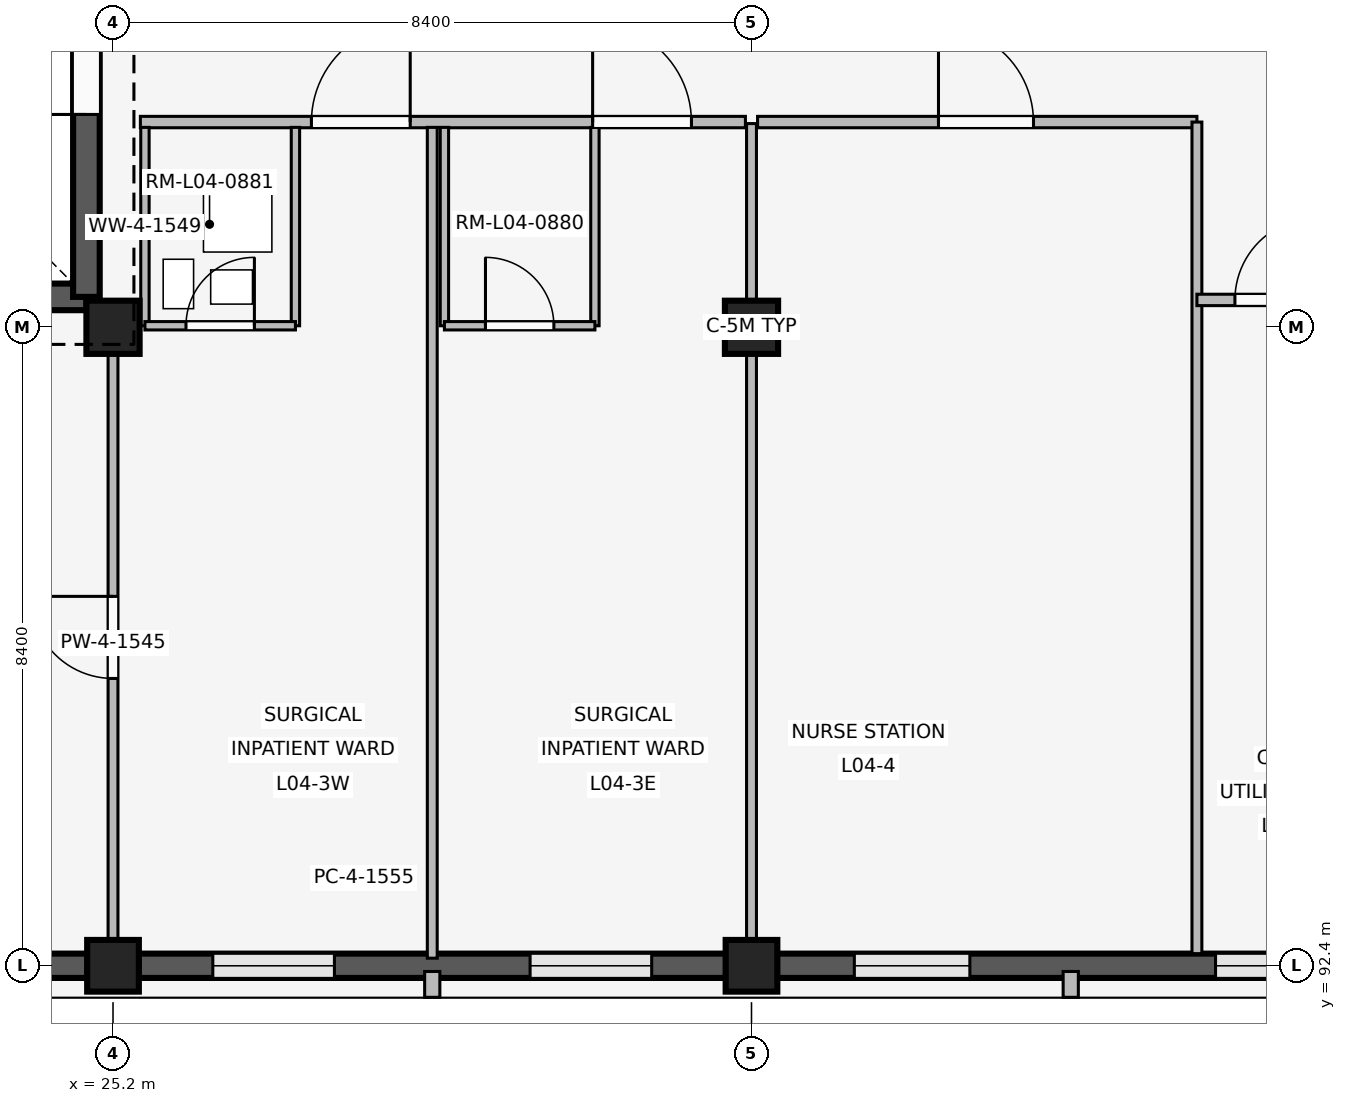
"""IFC4 building model, lengths in metres.
Left out: names, types, materials, properties, quantities, classifications, styles, units other than length and angle.
Written with IfcOpenShell. Run it as: python <this file> out.ifc"""

import sys

from ifc_helpers import new_model, si_unit, direction, frame, frame_2d, origin, origin_2d, place, context, subcontext, project, spatial, rectangle, extrude, element, fill, save


model = new_model("IFC4")
c1 = context("Model", 3, precision=1e-05, world=origin(), true_north=direction((0.0, 1.0)))
c2 = subcontext(c1, "Body", "Model", "MODEL_VIEW")
j1 = project(units=[si_unit("LENGTHUNIT", "METRE"), si_unit("PLANEANGLEUNIT", "RADIAN")], contexts=[c1])
p1 = place(None, origin())
s1 = spatial("IfcSite", under=j1, at=p1, CompositionType="ELEMENT")
p2 = place(p1, origin())
s2 = spatial("IfcBuilding", under=s1, at=p2, CompositionType="ELEMENT")
p3 = place(p2, frame((0.0, 0.0, 16.2)))
s3 = spatial("IfcBuildingStorey", under=s2, at=p3, CompositionType="ELEMENT", Elevation=16.2)
p4 = place(p3, frame((25.2, 92.4, 0.0), z_axis=(0.0, 0.0, 1.0), x_axis=(1.0, 0.0, 0.0)))
e1 = element("IfcColumn", 1, at=p4, inside=s3, PredefinedType="COLUMN", context=c2, shape_type="SweptSolid", body=[
    extrude(rectangle(XDim=0.68, YDim=0.68, at=origin_2d()), origin(), (0.0, 0.0, 1.0), 4.2),
])
p5 = place(p3, frame((25.2, 100.8, 0.0), z_axis=(0.0, 0.0, 1.0), x_axis=(1.0, 0.0, 0.0)))
e2 = element("IfcColumn", 2, at=p5, inside=s3, PredefinedType="COLUMN", context=c2, shape_type="SweptSolid", body=[
    extrude(rectangle(XDim=0.7, YDim=0.7, at=origin_2d()), origin(), (0.0, 0.0, 1.0), 4.2),
])
p6 = place(p3, frame((33.6, 92.4, 0.0), z_axis=(0.0, 0.0, 1.0), x_axis=(1.0, 0.0, 0.0)))
e3 = element("IfcColumn", 3, at=p6, inside=s3, PredefinedType="COLUMN", context=c2, shape_type="SweptSolid", body=[
    extrude(rectangle(XDim=0.68, YDim=0.68, at=origin_2d()), origin(), (0.0, 0.0, 1.0), 4.2),
])
p7 = place(p3, frame((33.6, 100.8, 0.0), z_axis=(0.0, 0.0, 1.0), x_axis=(1.0, 0.0, 0.0)))
e4 = element("IfcColumn", 4, at=p7, inside=s3, PredefinedType="COLUMN", context=c2, shape_type="SweptSolid", body=[
    extrude(rectangle(XDim=0.7, YDim=0.7, at=origin_2d()), origin(), (0.0, 0.0, 1.0), 4.2),
])
p8 = place(p3, frame((24.865, 92.4, 0.0), z_axis=(0.0, 0.0, 1.0), x_axis=(-1.0, 0.0, 0.0)))
e5 = element("IfcWall", 5, at=p8, inside=s3, PredefinedType="SOLIDWALL", context=c2, shape_type="SweptSolid", body=[
    extrude(rectangle(XDim=7.73, YDim=0.32, at=frame_2d((3.865, 0.0))), origin(), (0.0, 0.0, 1.0), 3.32),
])
p9 = place(p8, frame((0.968, 0.0, 0.85)))
e6 = element("IfcOpeningElement", 6, at=p9, cuts=e5, PredefinedType="OPENING", context=c2, shape_type="SweptSolid", body=[
    extrude(rectangle(XDim=1.62, YDim=1.52, at=frame_2d((0.81, 0.76))), frame((0.0, 0.17, 0.0), z_axis=(0.0, -1.0, 0.0), x_axis=(1.0, 0.0, 0.0)), (0.0, 0.0, 1.0), 0.34),
])
p10 = place(p8, frame((5.142, 0.0, 0.85)))
e7 = element("IfcOpeningElement", 7, at=p10, cuts=e5, PredefinedType="OPENING", context=c2, shape_type="SweptSolid", body=[
    extrude(rectangle(XDim=1.62, YDim=1.52, at=frame_2d((0.81, 0.76))), frame((0.0, 0.17, 0.0), z_axis=(0.0, -1.0, 0.0), x_axis=(1.0, 0.0, 0.0)), (0.0, 0.0, 1.0), 0.34),
])
p11 = place(p3, frame((33.265, 92.4, 0.0), z_axis=(0.0, 0.0, 1.0), x_axis=(-1.0, 0.0, 0.0)))
e8 = element("IfcWall", 8, at=p11, inside=s3, PredefinedType="SOLIDWALL", context=c2, shape_type="SweptSolid", body=[
    extrude(rectangle(XDim=7.73, YDim=0.32, at=frame_2d((3.865, 0.0))), origin(), (0.0, 0.0, 1.0), 3.32),
])
p12 = place(p11, frame((0.978, 0.0, 0.85)))
e9 = element("IfcOpeningElement", 9, at=p12, cuts=e8, PredefinedType="OPENING", context=c2, shape_type="SweptSolid", body=[
    extrude(rectangle(XDim=1.6, YDim=1.65, at=frame_2d((0.8, 0.825))), frame((0.0, 0.17, 0.0), z_axis=(0.0, -1.0, 0.0), x_axis=(1.0, 0.0, 0.0)), (0.0, 0.0, 1.0), 0.34),
])
p13 = place(p11, frame((5.152, 0.0, 0.85)))
e10 = element("IfcOpeningElement", 10, at=p13, cuts=e8, PredefinedType="OPENING", context=c2, shape_type="SweptSolid", body=[
    extrude(rectangle(XDim=1.6, YDim=1.65, at=frame_2d((0.8, 0.825))), frame((0.0, 0.17, 0.0), z_axis=(0.0, -1.0, 0.0), x_axis=(1.0, 0.0, 0.0)), (0.0, 0.0, 1.0), 0.34),
])
p14 = place(p3, frame((29.4, 92.325, 0.0), z_axis=(0.0, 0.0, 1.0), x_axis=(0.0, -1.0, 0.0)))
e11 = element("IfcWall", 11, at=p14, inside=s3, PredefinedType="ELEMENTEDWALL", context=c2, shape_type="SweptSolid", body=[
    extrude(rectangle(XDim=0.34, YDim=0.2, at=frame_2d((0.17, 0.0))), origin(), (0.0, 0.0, 1.0), 3.3),
])
p15 = place(p3, frame((41.665, 92.4, 0.0), z_axis=(0.0, 0.0, 1.0), x_axis=(-1.0, 0.0, 0.0)))
e12 = element("IfcWall", 12, at=p15, inside=s3, PredefinedType="SOLIDWALL", context=c2, shape_type="SweptSolid", body=[
    extrude(rectangle(XDim=7.73, YDim=0.32, at=frame_2d((3.865, 0.0))), origin(), (0.0, 0.0, 1.0), 3.32),
])
p16 = place(p15, frame((0.44, 0.0, 0.85)))
e13 = element("IfcOpeningElement", 13, at=p16, cuts=e12, PredefinedType="OPENING", context=c2, shape_type="SweptSolid", body=[
    extrude(rectangle(XDim=1.52, YDim=1.65, at=frame_2d((0.76, 0.825))), frame((0.0, 0.17, 0.0), z_axis=(0.0, -1.0, 0.0), x_axis=(1.0, 0.0, 0.0)), (0.0, 0.0, 1.0), 0.34),
])
p17 = place(p15, frame((5.192, 0.0, 0.85)))
e14 = element("IfcOpeningElement", 14, at=p17, cuts=e12, PredefinedType="OPENING", context=c2, shape_type="SweptSolid", body=[
    extrude(rectangle(XDim=1.52, YDim=1.65, at=frame_2d((0.76, 0.825))), frame((0.0, 0.17, 0.0), z_axis=(0.0, -1.0, 0.0), x_axis=(1.0, 0.0, 0.0)), (0.0, 0.0, 1.0), 0.34),
])
p18 = place(p3, frame((37.8, 92.325, 0.0), z_axis=(0.0, 0.0, 1.0), x_axis=(0.0, -1.0, 0.0)))
e15 = element("IfcWall", 15, at=p18, inside=s3, PredefinedType="ELEMENTEDWALL", context=c2, shape_type="SweptSolid", body=[
    extrude(rectangle(XDim=0.34, YDim=0.2, at=frame_2d((0.17, 0.0))), origin(), (0.0, 0.0, 1.0), 3.3),
])
p19 = place(p3, frame((17.35, 101.2, 0.0), z_axis=(0.0, 0.0, 1.0), x_axis=(1.0, 0.0, 0.0)))
e16 = element("IfcWall", 16, at=p19, inside=s3, PredefinedType="SHEAR", context=c2, shape_type="SweptSolid", body=[
    extrude(rectangle(XDim=7.5, YDim=0.35, at=frame_2d((3.75, 0.0))), origin(), (0.0, 0.0, 1.0), 3.92),
])
p20 = place(p19, frame((4.85, 0.0, 0.0)))
e17 = element("IfcOpeningElement", 17, at=p20, cuts=e16, PredefinedType="OPENING", context=c2, shape_type="SweptSolid", body=[
    extrude(rectangle(XDim=1.2, YDim=2.2, at=frame_2d((0.6, 1.1))), frame((0.0, 0.185, 0.0), z_axis=(0.0, -1.0, 0.0), x_axis=(1.0, 0.0, 0.0)), (0.0, 0.0, 1.0), 0.37),
])
p21 = place(p3, frame((24.85, 101.2, 0.0), z_axis=(0.0, 0.0, 1.0), x_axis=(0.0, 1.0, 0.0)))
e18 = element("IfcWall", 18, at=p21, inside=s3, PredefinedType="SHEAR", context=c2, shape_type="SweptSolid", body=[
    extrude(rectangle(XDim=7.55, YDim=0.35, at=frame_2d((3.775, 0.0))), origin(), (0.0, 0.0, 1.0), 3.92),
])
p22 = place(p21, frame((2.4, 0.0, 0.0)))
e19 = element("IfcOpeningElement", 19, at=p22, cuts=e18, PredefinedType="OPENING", context=c2, shape_type="SweptSolid", body=[
    extrude(rectangle(XDim=1.2, YDim=2.2, at=frame_2d((0.6, 1.1))), frame((0.0, 0.185, 0.0), z_axis=(0.0, -1.0, 0.0), x_axis=(1.0, 0.0, 0.0)), (0.0, 0.0, 1.0), 0.37),
])
p23 = place(p3, frame((25.2, 92.54, 0.0), z_axis=(0.0, 0.0, 1.0), x_axis=(0.0, 1.0, 0.0)))
e20 = element("IfcWall", 20, at=p23, inside=s3, PredefinedType="PARTITIONING", context=c2, shape_type="SweptSolid", body=[
    extrude(rectangle(XDim=8.21, YDim=0.13, at=frame_2d((4.105, 0.0))), origin(), (0.0, 0.0, 1.0), 3.3),
])
p24 = place(p23, frame((3.64, 0.0, 0.0)))
e21 = element("IfcOpeningElement", 21, at=p24, cuts=e20, PredefinedType="OPENING", context=c2, shape_type="SweptSolid", body=[
    extrude(rectangle(XDim=1.08, YDim=2.15, at=frame_2d((0.54, 1.075))), frame((0.0, 0.075, 0.0), z_axis=(0.0, -1.0, 0.0), x_axis=(1.0, 0.0, 0.0)), (0.0, 0.0, 1.0), 0.15),
])
p25 = place(p3, frame((25.56, 103.5, 0.0), z_axis=(0.0, 0.0, 1.0), x_axis=(1.0, 0.0, 0.0)))
e22 = element("IfcWall", 22, at=p25, inside=s3, PredefinedType="PARTITIONING", context=c2, shape_type="SweptSolid", body=[
    extrude(rectangle(XDim=7.96, YDim=0.15, at=frame_2d((3.98, 0.0))), origin(), (0.0, 0.0, 1.0), 3.3),
])
p26 = place(p25, frame((2.25, 0.0, 0.0)))
e23 = element("IfcOpeningElement", 23, at=p26, cuts=e22, PredefinedType="OPENING", context=c2, shape_type="SweptSolid", body=[
    extrude(rectangle(XDim=1.3, YDim=2.25, at=frame_2d((0.65, 1.125))), frame((0.0, 0.085, 0.0), z_axis=(0.0, -1.0, 0.0), x_axis=(1.0, 0.0, 0.0)), (0.0, 0.0, 1.0), 0.17),
])
p27 = place(p25, frame((5.95, 0.0, 0.0)))
e24 = element("IfcOpeningElement", 24, at=p27, cuts=e22, PredefinedType="OPENING", context=c2, shape_type="SweptSolid", body=[
    extrude(rectangle(XDim=1.3, YDim=2.25, at=frame_2d((0.65, 1.125))), frame((0.0, 0.085, 0.0), z_axis=(0.0, -1.0, 0.0), x_axis=(1.0, 0.0, 0.0)), (0.0, 0.0, 1.0), 0.17),
])
p28 = place(p3, frame((29.4, 92.5, 0.0), z_axis=(0.0, 0.0, 1.0), x_axis=(0.0, 1.0, 0.0)))
e25 = element("IfcWall", 25, at=p28, inside=s3, PredefinedType="PARTITIONING", context=c2, shape_type="SweptSolid", body=[
    extrude(rectangle(XDim=10.93, YDim=0.13, at=frame_2d((5.465, 0.0))), origin(), (0.0, 0.0, 1.0), 3.3),
])
for number, where, z_axis, x_axis in (
    (26, (25.62, 100.82, 0.0), (0.0, 0.0, 1.0), (0.0, 1.0, 0.0)),
    (27, (27.6, 100.82, 0.0), (0.0, 0.0, 1.0), (0.0, 1.0, 0.0)),
):
    element("IfcWall", number, at=place(p3, frame(where, z_axis=z_axis, x_axis=x_axis)), inside=s3, PredefinedType="PARTITIONING", context=c2, shape_type="SweptSolid", body=[
        extrude(rectangle(XDim=2.61, YDim=0.11, at=frame_2d((1.305, 0.0))), origin(), (0.0, 0.0, 1.0), 3.3),
    ])
p29 = place(p3, frame((25.62, 100.82, 0.0), z_axis=(0.0, 0.0, 1.0), x_axis=(1.0, 0.0, 0.0)))
e28 = element("IfcWall", 28, at=p29, inside=s3, PredefinedType="PARTITIONING", context=c2, shape_type="SweptSolid", body=[
    extrude(rectangle(XDim=1.98, YDim=0.11, at=frame_2d((0.99, 0.0))), origin(), (0.0, 0.0, 1.0), 3.3),
])
p30 = place(p29, frame((0.54, 0.0, 0.0)))
e29 = element("IfcOpeningElement", 29, at=p30, cuts=e28, PredefinedType="OPENING", context=c2, shape_type="SweptSolid", body=[
    extrude(rectangle(XDim=0.9, YDim=2.1, at=frame_2d((0.45, 1.05))), frame((0.0, 0.065, 0.0), z_axis=(0.0, -1.0, 0.0), x_axis=(1.0, 0.0, 0.0)), (0.0, 0.0, 1.0), 0.13),
])
for number, where, z_axis, x_axis in (
    (30, (29.56, 100.82, 0.0), (0.0, 0.0, 1.0), (0.0, 1.0, 0.0)),
    (31, (31.54, 100.82, 0.0), (0.0, 0.0, 1.0), (0.0, 1.0, 0.0)),
):
    element("IfcWall", number, at=place(p3, frame(where, z_axis=z_axis, x_axis=x_axis)), inside=s3, PredefinedType="PARTITIONING", context=c2, shape_type="SweptSolid", body=[
        extrude(rectangle(XDim=2.61, YDim=0.11, at=frame_2d((1.305, 0.0))), origin(), (0.0, 0.0, 1.0), 3.3),
    ])
p31 = place(p3, frame((29.56, 100.82, 0.0), z_axis=(0.0, 0.0, 1.0), x_axis=(1.0, 0.0, 0.0)))
e32 = element("IfcWall", 32, at=p31, inside=s3, PredefinedType="PARTITIONING", context=c2, shape_type="SweptSolid", body=[
    extrude(rectangle(XDim=1.98, YDim=0.11, at=frame_2d((0.99, 0.0))), origin(), (0.0, 0.0, 1.0), 3.3),
])
p32 = place(p31, frame((0.54, 0.0, 0.0)))
e33 = element("IfcOpeningElement", 33, at=p32, cuts=e32, PredefinedType="OPENING", context=c2, shape_type="SweptSolid", body=[
    extrude(rectangle(XDim=0.9, YDim=2.1, at=frame_2d((0.45, 1.05))), frame((0.0, 0.065, 0.0), z_axis=(0.0, -1.0, 0.0), x_axis=(1.0, 0.0, 0.0)), (0.0, 0.0, 1.0), 0.13),
])
p33 = place(p3, frame((28.05, 93.55, 0.0), z_axis=(0.0, 0.0, 1.0), x_axis=(1.0, 0.0, 0.0)))
e34 = element("IfcWall", 34, at=p33, inside=s3, PredefinedType="PLUMBINGWALL", context=c2, shape_type="SweptSolid", body=[
    extrude(rectangle(XDim=0.9, YDim=0.24, at=frame_2d((0.45, 0.0))), origin(), (0.0, 0.0, 1.0), 3.3),
])
p34 = place(p3, frame((33.6, 92.54, 0.0), z_axis=(0.0, 0.0, 1.0), x_axis=(0.0, 1.0, 0.0)))
e35 = element("IfcWall", 35, at=p34, inside=s3, PredefinedType="PARTITIONING", context=c2, shape_type="SweptSolid", body=[
    extrude(rectangle(XDim=10.94, YDim=0.13, at=frame_2d((5.47, 0.0))), origin(), (0.0, 0.0, 1.0), 3.3),
])
p35 = place(p3, frame((33.68, 103.5, 0.0), z_axis=(0.0, 0.0, 1.0), x_axis=(1.0, 0.0, 0.0)))
e36 = element("IfcWall", 36, at=p35, inside=s3, PredefinedType="PARTITIONING", context=c2, shape_type="SweptSolid", body=[
    extrude(rectangle(XDim=5.78, YDim=0.15, at=frame_2d((2.89, 0.0))), origin(), (0.0, 0.0, 1.0), 3.3),
])
p36 = place(p35, frame((2.38, 0.0, 0.0)))
e37 = element("IfcOpeningElement", 37, at=p36, cuts=e36, PredefinedType="OPENING", context=c2, shape_type="SweptSolid", body=[
    extrude(rectangle(XDim=1.25, YDim=2.2, at=frame_2d((0.625, 1.1))), frame((0.0, 0.085, 0.0), z_axis=(0.0, -1.0, 0.0), x_axis=(1.0, 0.0, 0.0)), (0.0, 0.0, 1.0), 0.17),
])
p37 = place(p3, frame((39.46, 92.56, 0.0), z_axis=(0.0, 0.0, 1.0), x_axis=(0.0, 1.0, 0.0)))
e38 = element("IfcWall", 38, at=p37, inside=s3, PredefinedType="PARTITIONING", context=c2, shape_type="SweptSolid", body=[
    extrude(rectangle(XDim=10.94, YDim=0.13, at=frame_2d((5.47, 0.0))), origin(), (0.0, 0.0, 1.0), 3.3),
])
p38 = place(p3, frame((39.46, 101.16, 0.0), z_axis=(0.0, 0.0, 1.0), x_axis=(1.0, 0.0, 0.0)))
e39 = element("IfcWall", 39, at=p38, inside=s3, PredefinedType="PARTITIONING", context=c2, shape_type="SweptSolid", body=[
    extrude(rectangle(XDim=2.18, YDim=0.15, at=frame_2d((1.09, 0.0))), origin(), (0.0, 0.0, 1.0), 3.3),
])
p39 = place(p38, frame((0.5, 0.0, 0.0)))
e40 = element("IfcOpeningElement", 40, at=p39, cuts=e39, PredefinedType="OPENING", context=c2, shape_type="SweptSolid", body=[
    extrude(rectangle(XDim=1.08, YDim=2.15, at=frame_2d((0.54, 1.075))), frame((0.0, 0.085, 0.0), z_axis=(0.0, -1.0, 0.0), x_axis=(1.0, 0.0, 0.0)), (0.0, 0.0, 1.0), 0.17),
])
p40 = place(p12, origin())
e41 = element("IfcWindow", 41, at=p40, inside=s3, PartitioningType="SINGLE_PANEL", PredefinedType="WINDOW", context=c2, shape_type="SweptSolid", body=[
    extrude(rectangle(XDim=1.6, YDim=1.65, at=frame_2d((0.8, 0.825))), frame((0.0, 0.03, 0.0), z_axis=(0.0, -1.0, 0.0), x_axis=(1.0, 0.0, 0.0)), (0.0, 0.0, 1.0), 0.06),
])
fill(e9, e41)
p41 = place(p13, origin())
e42 = element("IfcWindow", 42, at=p41, inside=s3, PartitioningType="SINGLE_PANEL", PredefinedType="WINDOW", context=c2, shape_type="SweptSolid", body=[
    extrude(rectangle(XDim=1.6, YDim=1.65, at=frame_2d((0.8, 0.825))), frame((0.0, 0.03, 0.0), z_axis=(0.0, -1.0, 0.0), x_axis=(1.0, 0.0, 0.0)), (0.0, 0.0, 1.0), 0.06),
])
fill(e10, e42)
p42 = place(p16, origin())
e43 = element("IfcWindow", 43, at=p42, inside=s3, PartitioningType="SINGLE_PANEL", PredefinedType="WINDOW", context=c2, shape_type="SweptSolid", body=[
    extrude(rectangle(XDim=1.52, YDim=1.65, at=frame_2d((0.76, 0.825))), frame((0.0, 0.03, 0.0), z_axis=(0.0, -1.0, 0.0), x_axis=(1.0, 0.0, 0.0)), (0.0, 0.0, 1.0), 0.06),
])
fill(e13, e43)
p43 = place(p17, origin())
e44 = element("IfcWindow", 44, at=p43, inside=s3, PartitioningType="SINGLE_PANEL", PredefinedType="WINDOW", context=c2, shape_type="SweptSolid", body=[
    extrude(rectangle(XDim=1.52, YDim=1.65, at=frame_2d((0.76, 0.825))), frame((0.0, 0.03, 0.0), z_axis=(0.0, -1.0, 0.0), x_axis=(1.0, 0.0, 0.0)), (0.0, 0.0, 1.0), 0.06),
])
fill(e14, e44)
p44 = place(p22, origin())
e45 = element("IfcDoor", 45, at=p44, inside=s3, OperationType="SINGLE_SWING_LEFT", PredefinedType="DOOR", context=c2, shape_type="SweptSolid", body=[
    extrude(rectangle(XDim=1.2, YDim=2.2, at=frame_2d((0.6, 1.1))), frame((0.0, 0.025, 0.0), z_axis=(0.0, -1.0, 0.0), x_axis=(1.0, 0.0, 0.0)), (0.0, 0.0, 1.0), 0.05),
])
fill(e19, e45)
p45 = place(p24, origin())
e46 = element("IfcDoor", 46, at=p45, inside=s3, OperationType="SINGLE_SWING_RIGHT", PredefinedType="DOOR", context=c2, shape_type="SweptSolid", body=[
    extrude(rectangle(XDim=1.08, YDim=2.15, at=frame_2d((0.54, 1.075))), frame((0.0, 0.025, 0.0), z_axis=(0.0, -1.0, 0.0), x_axis=(1.0, 0.0, 0.0)), (0.0, 0.0, 1.0), 0.05),
])
fill(e21, e46)
p46 = place(p26, origin())
e47 = element("IfcDoor", 47, at=p46, inside=s3, OperationType="SINGLE_SWING_RIGHT", PredefinedType="DOOR", context=c2, shape_type="SweptSolid", body=[
    extrude(rectangle(XDim=1.3, YDim=2.25, at=frame_2d((0.65, 1.125))), frame((0.0, 0.025, 0.0), z_axis=(0.0, -1.0, 0.0), x_axis=(1.0, 0.0, 0.0)), (0.0, 0.0, 1.0), 0.05),
])
fill(e23, e47)
p47 = place(p27, origin())
e48 = element("IfcDoor", 48, at=p47, inside=s3, OperationType="SINGLE_SWING_LEFT", PredefinedType="DOOR", context=c2, shape_type="SweptSolid", body=[
    extrude(rectangle(XDim=1.3, YDim=2.25, at=frame_2d((0.65, 1.125))), frame((0.0, 0.025, 0.0), z_axis=(0.0, -1.0, 0.0), x_axis=(1.0, 0.0, 0.0)), (0.0, 0.0, 1.0), 0.05),
])
fill(e24, e48)
p48 = place(p30, origin())
e49 = element("IfcDoor", 49, at=p48, inside=s3, OperationType="SINGLE_SWING_RIGHT", PredefinedType="DOOR", context=c2, shape_type="SweptSolid", body=[
    extrude(rectangle(XDim=0.9, YDim=2.1, at=frame_2d((0.45, 1.05))), frame((0.0, 0.025, 0.0), z_axis=(0.0, -1.0, 0.0), x_axis=(1.0, 0.0, 0.0)), (0.0, 0.0, 1.0), 0.05),
])
fill(e29, e49)
p49 = place(p32, origin())
e50 = element("IfcDoor", 50, at=p49, inside=s3, OperationType="SINGLE_SWING_LEFT", PredefinedType="DOOR", context=c2, shape_type="SweptSolid", body=[
    extrude(rectangle(XDim=0.9, YDim=2.1, at=frame_2d((0.45, 1.05))), frame((0.0, 0.025, 0.0), z_axis=(0.0, -1.0, 0.0), x_axis=(1.0, 0.0, 0.0)), (0.0, 0.0, 1.0), 0.05),
])
fill(e33, e50)
p50 = place(p36, origin())
e51 = element("IfcDoor", 51, at=p50, inside=s3, OperationType="SINGLE_SWING_LEFT", PredefinedType="DOOR", context=c2, shape_type="SweptSolid", body=[
    extrude(rectangle(XDim=1.25, YDim=2.2, at=frame_2d((0.625, 1.1))), frame((0.0, 0.025, 0.0), z_axis=(0.0, -1.0, 0.0), x_axis=(1.0, 0.0, 0.0)), (0.0, 0.0, 1.0), 0.05),
])
fill(e37, e51)
p51 = place(p39, origin())
e52 = element("IfcDoor", 52, at=p51, inside=s3, OperationType="SINGLE_SWING_RIGHT", PredefinedType="DOOR", context=c2, shape_type="SweptSolid", body=[
    extrude(rectangle(XDim=1.08, YDim=2.15, at=frame_2d((0.54, 1.075))), frame((0.0, 0.025, 0.0), z_axis=(0.0, -1.0, 0.0), x_axis=(1.0, 0.0, 0.0)), (0.0, 0.0, 1.0), 0.05),
])
fill(e40, e52)
save(model, sys.argv[1])
